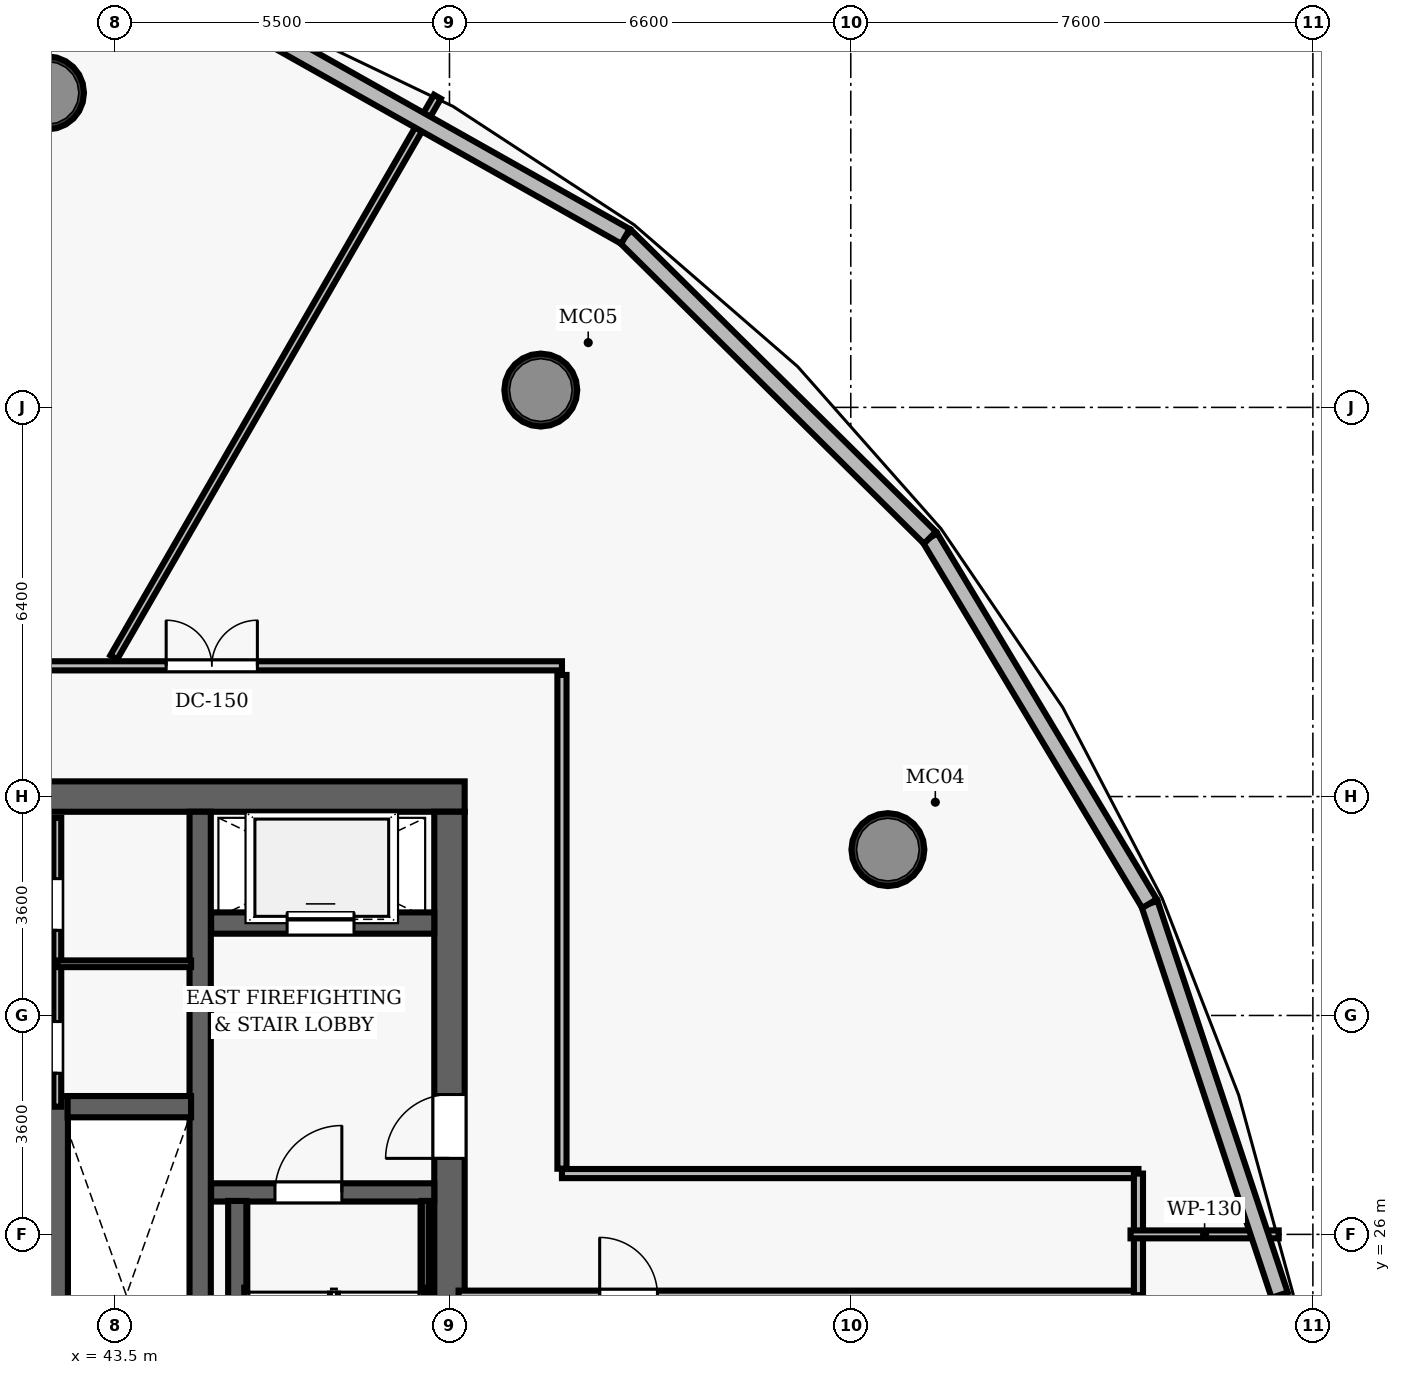
"""IFC4 building model, lengths in metres.
Left out: names, types, materials, properties, quantities, classifications, styles, units other than length and angle.
Written with IfcOpenShell. Run it as: python <this file> out.ifc"""

import sys

from ifc_helpers import new_model, si_unit, direction, frame, frame_2d, origin, origin_2d, place, context, subcontext, project, spatial, rectangle, hollow_circle, extrude, element, fill, save


model = new_model("IFC4")
c1 = context("Model", 3, precision=1e-05, world=origin(), true_north=direction((0.0, 1.0)))
c2 = subcontext(c1, "Body", "Model", "MODEL_VIEW")
j1 = project(units=[si_unit("LENGTHUNIT", "METRE"), si_unit("PLANEANGLEUNIT", "RADIAN")], contexts=[c1])
p1 = place(None, origin())
s1 = spatial("IfcSite", under=j1, at=p1, CompositionType="ELEMENT")
p2 = place(p1, origin())
s2 = spatial("IfcBuilding", under=s1, at=p2, CompositionType="ELEMENT")
p3 = place(p2, frame((0.0, 0.0, 178.9)))
s3 = spatial("IfcBuildingStorey", under=s2, at=p3, CompositionType="ELEMENT", Elevation=178.9)
p4 = place(p3, frame((26.75, 33.2, 0.0), z_axis=(0.0, 0.0, 1.0), x_axis=(1.0, 0.0, 0.0)))
e1 = element("IfcWall", 1, at=p4, inside=s3, PredefinedType="SHEAR", context=c2, shape_type="SweptSolid", body=[
    extrude(rectangle(XDim=22.5, YDim=0.5, at=frame_2d((11.25, 0.0))), origin(), (0.0, 0.0, 1.0), 3.85),
])
p5 = place(p4, frame((4.57, 0.0, 0.0)))
e2 = element("IfcOpeningElement", 2, at=p5, cuts=e1, PredefinedType="OPENING", context=c2, shape_type="SweptSolid", body=[
    extrude(rectangle(XDim=1.05, YDim=2.15, at=frame_2d((0.525, 1.075))), frame((0.0, 0.26, 0.0), z_axis=(0.0, -1.0, 0.0), x_axis=(1.0, 0.0, 0.0)), (0.0, 0.0, 1.0), 0.52),
])
p6 = place(p4, frame((14.47, 0.0, 0.0)))
e3 = element("IfcOpeningElement", 3, at=p6, cuts=e1, PredefinedType="OPENING", context=c2, shape_type="SweptSolid", body=[
    extrude(rectangle(XDim=1.05, YDim=2.15, at=frame_2d((0.525, 1.075))), frame((0.0, 0.26, 0.0), z_axis=(0.0, -1.0, 0.0), x_axis=(1.0, 0.0, 0.0)), (0.0, 0.0, 1.0), 0.52),
])
p7 = place(p3, frame((49.0, 19.05, 0.0), z_axis=(0.0, 0.0, 1.0), x_axis=(0.0, 1.0, 0.0)))
e4 = element("IfcWall", 4, at=p7, inside=s3, PredefinedType="SHEAR", context=c2, shape_type="SweptSolid", body=[
    extrude(rectangle(XDim=13.9, YDim=0.5, at=frame_2d((6.95, 0.0))), origin(), (0.0, 0.0, 1.0), 3.85),
])
p8 = place(p7, frame((8.2, 0.0, 0.0)))
e5 = element("IfcOpeningElement", 5, at=p8, cuts=e4, PredefinedType="OPENING", context=c2, shape_type="SweptSolid", body=[
    extrude(rectangle(XDim=1.05, YDim=2.15, at=frame_2d((0.525, 1.075))), frame((0.0, 0.26, 0.0), z_axis=(0.0, -1.0, 0.0), x_axis=(1.0, 0.0, 0.0)), (0.0, 0.0, 1.0), 0.52),
])
p9 = place(p3, frame((44.9, 19.05, 0.0), z_axis=(0.0, 0.0, 1.0), x_axis=(0.0, 1.0, 0.0)))
e6 = element("IfcWall", 6, at=p9, inside=s3, PredefinedType="SHEAR", context=c2, shape_type="SweptSolid", body=[
    extrude(rectangle(XDim=13.9, YDim=0.35, at=frame_2d((6.95, 0.0))), origin(), (0.0, 0.0, 1.0), 3.85),
])
for number, where, z_axis, x_axis in (
    (7, (56.21, 32.327, 0.0), (0.0, 0.0, 1.0), (1.0, 0.0, 0.0)),
    (8, (50.502, 39.885, 0.0), (0.0, 0.0, 1.0), (1.0, 0.0, 0.0)),
    (9, (42.389, 44.772, 0.0), (0.0, 0.0, 1.0), (1.0, 0.0, 0.0)),
):
    element("IfcColumn", number, at=place(p3, frame(where, z_axis=z_axis, x_axis=x_axis)), inside=s3, PredefinedType="COLUMN", context=c2, shape_type="SweptSolid", body=[
        extrude(hollow_circle(Radius=0.6, WallThickness=0.05, at=origin_2d()), origin(), (0.0, 0.0, 1.0), 3.85),
    ])
p10 = place(p3, frame((45.08, 26.69, 0.0), z_axis=(0.0, 0.0, 1.0), x_axis=(1.0, 0.0, 0.0)))
e10 = element("IfcWall", 10, at=p10, inside=s3, PredefinedType="SHEAR", context=c2, shape_type="SweptSolid", body=[
    extrude(rectangle(XDim=3.67, YDim=0.3, at=frame_2d((1.835, 0.0))), origin(), (0.0, 0.0, 1.0), 3.85),
])
p11 = place(p10, frame((1.05, 0.0, 0.0)))
e11 = element("IfcOpeningElement", 11, at=p11, cuts=e10, PredefinedType="OPENING", context=c2, shape_type="SweptSolid", body=[
    extrude(rectangle(XDim=1.1, YDim=2.15, at=frame_2d((0.55, 1.075))), frame((0.0, 0.16, 0.0), z_axis=(0.0, -1.0, 0.0), x_axis=(1.0, 0.0, 0.0)), (0.0, 0.0, 1.0), 0.32),
])
p12 = place(p3, frame((45.51, 19.05, 0.0), z_axis=(0.0, 0.0, 1.0), x_axis=(0.0, 1.0, 0.0)))
e12 = element("IfcWall", 12, at=p12, inside=s3, PredefinedType="SHEAR", context=c2, shape_type="SweptSolid", body=[
    extrude(rectangle(XDim=7.5, YDim=0.3, at=frame_2d((3.75, 0.0))), origin(), (0.0, 0.0, 1.0), 3.85),
])
p13 = place(p3, frame((48.605, 19.1, 0.0), z_axis=(0.0, 0.0, 1.0), x_axis=(0.0, 1.0, 0.0)))
e13 = element("IfcWall", 13, at=p13, inside=s3, PredefinedType="SHEAR", context=c2, shape_type="SweptSolid", body=[
    extrude(rectangle(XDim=7.45, YDim=0.12, at=frame_2d((3.725, 0.0))), origin(), (0.0, 0.0, 1.0), 3.85),
])
p14 = place(p3, frame((45.08, 31.12, 0.0), z_axis=(0.0, 0.0, 1.0), x_axis=(1.0, 0.0, 0.0)))
e14 = element("IfcWall", 14, at=p14, inside=s3, PredefinedType="SHEAR", context=c2, shape_type="SweptSolid", body=[
    extrude(rectangle(XDim=3.67, YDim=0.35, at=frame_2d((1.835, 0.0))), origin(), (0.0, 0.0, 1.0), 3.035),
])
p15 = place(p14, frame((1.25, 0.0, 0.0)))
e15 = element("IfcOpeningElement", 15, at=p15, cuts=e14, PredefinedType="OPENING", context=c2, shape_type="SweptSolid", body=[
    extrude(rectangle(XDim=1.1, YDim=2.15, at=frame_2d((0.55, 1.075))), frame((0.0, 0.185, 0.0), z_axis=(0.0, -1.0, 0.0), x_axis=(1.0, 0.0, 0.0)), (0.0, 0.0, 1.0), 0.37),
])
p16 = place(p3, frame((42.55, 21.73, 0.0), z_axis=(0.0, 0.0, 1.0), x_axis=(0.0, 1.0, 0.0)))
e16 = element("IfcWall", 16, at=p16, inside=s3, PredefinedType="SHEAR", context=c2, shape_type="SweptSolid", body=[
    extrude(rectangle(XDim=6.54, YDim=0.35, at=frame_2d((3.27, 0.0))), origin(), (0.0, 0.0, 1.0), 3.035),
])
p17 = place(p3, frame((42.72, 28.1, 0.0), z_axis=(0.0, 0.0, 1.0), x_axis=(1.0, 0.0, 0.0)))
e17 = element("IfcWall", 17, at=p17, inside=s3, PredefinedType="SHEAR", context=c2, shape_type="SweptSolid", body=[
    extrude(rectangle(XDim=2.03, YDim=0.35, at=frame_2d((1.015, 0.0))), origin(), (0.0, 0.0, 1.0), 3.035),
])
p18 = place(p3, frame((42.55, 28.1, 0.0), z_axis=(0.0, 0.0, 1.0), x_axis=(0.0, 1.0, 0.0)))
e18 = element("IfcWall", 18, at=p18, inside=s3, PredefinedType="PARTITIONING", context=c2, shape_type="SweptSolid", body=[
    extrude(rectangle(XDim=4.75, YDim=0.13, at=frame_2d((2.375, 0.0))), origin(), (0.0, 0.0, 1.0), 3.035),
])
p19 = place(p18, frame((0.55, 0.0, 0.0)))
e19 = element("IfcOpeningElement", 19, at=p19, cuts=e18, PredefinedType="OPENING", context=c2, shape_type="SweptSolid", body=[
    extrude(rectangle(XDim=0.85, YDim=2.1, at=frame_2d((0.425, 1.05))), frame((0.0, 0.075, 0.0), z_axis=(0.0, -1.0, 0.0), x_axis=(1.0, 0.0, 0.0)), (0.0, 0.0, 1.0), 0.15),
])
p20 = place(p18, frame((2.9, 0.0, 0.0)))
e20 = element("IfcOpeningElement", 20, at=p20, cuts=e18, PredefinedType="OPENING", context=c2, shape_type="SweptSolid", body=[
    extrude(rectangle(XDim=0.85, YDim=2.1, at=frame_2d((0.425, 1.05))), frame((0.0, 0.075, 0.0), z_axis=(0.0, -1.0, 0.0), x_axis=(1.0, 0.0, 0.0)), (0.0, 0.0, 1.0), 0.15),
])
p21 = place(p3, frame((42.55, 30.45, 0.0), z_axis=(0.0, 0.0, 1.0), x_axis=(1.0, 0.0, 0.0)))
e21 = element("IfcWall", 21, at=p21, inside=s3, PredefinedType="PARTITIONING", context=c2, shape_type="SweptSolid", body=[
    extrude(rectangle(XDim=2.2, YDim=0.11, at=frame_2d((1.1, 0.0))), origin(), (0.0, 0.0, 1.0), 3.035),
])
p22 = place(p3, frame((24.85, 35.35, 0.0), z_axis=(0.0, 0.0, 1.0), x_axis=(1.0, 0.0, 0.0)))
e22 = element("IfcWall", 22, at=p22, inside=s3, PredefinedType="PARTITIONING", context=c2, shape_type="SweptSolid", body=[
    extrude(rectangle(XDim=26.0, YDim=0.15, at=frame_2d((13.0, 0.0))), origin(), (0.0, 0.0, 1.0), 3.035),
])
p23 = place(p22, frame((19.491, 0.0, 0.0)))
e23 = element("IfcOpeningElement", 23, at=p23, cuts=e22, PredefinedType="OPENING", context=c2, shape_type="SweptSolid", body=[
    extrude(rectangle(XDim=1.5, YDim=2.2, at=frame_2d((0.75, 1.1))), frame((0.0, 0.085, 0.0), z_axis=(0.0, -1.0, 0.0), x_axis=(1.0, 0.0, 0.0)), (0.0, 0.0, 1.0), 0.17),
])
p24 = place(p22, frame((9.516, 0.0, 0.0)))
e24 = element("IfcOpeningElement", 24, at=p24, cuts=e22, PredefinedType="OPENING", context=c2, shape_type="SweptSolid", body=[
    extrude(rectangle(XDim=1.5, YDim=2.2, at=frame_2d((0.75, 1.1))), frame((0.0, 0.085, 0.0), z_axis=(0.0, -1.0, 0.0), x_axis=(1.0, 0.0, 0.0)), (0.0, 0.0, 1.0), 0.17),
])
p25 = place(p22, frame((5.234, 0.0, 0.0)))
e25 = element("IfcOpeningElement", 25, at=p25, cuts=e22, PredefinedType="OPENING", context=c2, shape_type="SweptSolid", body=[
    extrude(rectangle(XDim=1.5, YDim=2.2, at=frame_2d((0.75, 1.1))), frame((0.0, 0.085, 0.0), z_axis=(0.0, -1.0, 0.0), x_axis=(1.0, 0.0, 0.0)), (0.0, 0.0, 1.0), 0.17),
])
p26 = place(p3, frame((50.85, 27.08, 0.0), z_axis=(0.0, 0.0, 1.0), x_axis=(0.0, 1.0, 0.0)))
e26 = element("IfcWall", 26, at=p26, inside=s3, PredefinedType="PARTITIONING", context=c2, shape_type="SweptSolid", body=[
    extrude(rectangle(XDim=8.12, YDim=0.15, at=frame_2d((4.06, 0.0))), origin(), (0.0, 0.0, 1.0), 3.035),
])
p27 = place(p3, frame((50.85, 27.0, 0.0), z_axis=(0.0, 0.0, 1.0), x_axis=(1.0, 0.0, 0.0)))
e27 = element("IfcWall", 27, at=p27, inside=s3, PredefinedType="PARTITIONING", context=c2, shape_type="SweptSolid", body=[
    extrude(rectangle(XDim=9.481, YDim=0.15, at=frame_2d((4.74, 0.0))), origin(), (0.0, 0.0, 1.0), 3.035),
])
p28 = place(p3, frame((49.15, 25.0, 0.0), z_axis=(0.0, 0.0, 1.0), x_axis=(1.0, 0.0, 0.0)))
e28 = element("IfcWall", 28, at=p28, inside=s3, PredefinedType="PARTITIONING", context=c2, shape_type="SweptSolid", body=[
    extrude(rectangle(XDim=11.181, YDim=0.15, at=frame_2d((5.591, 0.0))), origin(), (0.0, 0.0, 1.0), 3.035),
])
p29 = place(p28, frame((2.32, 0.0, 0.0)))
e29 = element("IfcOpeningElement", 29, at=p29, cuts=e28, PredefinedType="OPENING", context=c2, shape_type="SweptSolid", body=[
    extrude(rectangle(XDim=0.95, YDim=2.15, at=frame_2d((0.475, 1.075))), frame((0.0, 0.085, 0.0), z_axis=(0.0, -1.0, 0.0), x_axis=(1.0, 0.0, 0.0)), (0.0, 0.0, 1.0), 0.17),
])
p30 = place(p3, frame((60.331, 25.0, 0.0), z_axis=(0.0, 0.0, 1.0), x_axis=(0.0, 1.0, 0.0)))
e30 = element("IfcWall", 30, at=p30, inside=s3, PredefinedType="PARTITIONING", context=c2, shape_type="SweptSolid", body=[
    extrude(rectangle(XDim=2.0, YDim=0.15, at=frame_2d((1.0, 0.0))), origin(), (0.0, 0.0, 1.0), 3.035),
])
p31 = place(p3, frame((60.201, 26.0, 0.0), z_axis=(0.0, 0.0, 1.0), x_axis=(1.0, 0.0, 0.0)))
e31 = element("IfcWall", 31, at=p31, inside=s3, PredefinedType="PARTITIONING", context=c2, shape_type="SweptSolid", body=[
    extrude(rectangle(XDim=2.437, YDim=0.13, at=frame_2d((1.219, 0.0))), origin(), (0.0, 0.0, 1.0), 3.035),
])
p32 = place(p3, frame((43.479, 35.49, 0.0), z_axis=(0.0, 0.0, 1.0), x_axis=(0.500004366266, 0.866022882905, 0.0)))
e32 = element("IfcWall", 32, at=p32, inside=s3, PredefinedType="PARTITIONING", context=c2, shape_type="SweptSolid", body=[
    extrude(rectangle(XDim=10.645, YDim=0.13, at=frame_2d((5.323, 0.0))), origin(), (0.0, 0.0, 1.0), 3.035),
])
p33 = place(p3, frame((60.512, 31.439, 0.0), z_axis=(0.0, 0.0, 1.0), x_axis=(0.315590755591, -0.948895397283, 0.0)))
e33 = element("IfcWall", 33, at=p33, inside=s3, PredefinedType="SOLIDWALL", context=c2, shape_type="SweptSolid", body=[
    extrude(rectangle(XDim=6.784, YDim=0.28, at=frame_2d((3.392, 0.0))), origin(), (0.0, 0.0, 1.0), 3.62),
])
p34 = place(p3, frame((56.902, 37.457, 0.0), z_axis=(0.0, 0.0, 1.0), x_axis=(0.514434360632, -0.857529759601, 0.0)))
e34 = element("IfcWall", 34, at=p34, inside=s3, PredefinedType="SOLIDWALL", context=c2, shape_type="SweptSolid", body=[
    extrude(rectangle(XDim=7.018, YDim=0.28, at=frame_2d((3.509, 0.0))), origin(), (0.0, 0.0, 1.0), 3.62),
])
p35 = place(p3, frame((51.894, 42.413, 0.0), z_axis=(0.0, 0.0, 1.0), x_axis=(0.710873697504, -0.703319689897, 0.0)))
e35 = element("IfcWall", 35, at=p35, inside=s3, PredefinedType="SOLIDWALL", context=c2, shape_type="SweptSolid", body=[
    extrude(rectangle(XDim=7.046, YDim=0.28, at=frame_2d((3.523, 0.0))), origin(), (0.0, 0.0, 1.0), 3.62),
])
p36 = place(p3, frame((45.756, 45.872, 0.0), z_axis=(0.0, 0.0, 1.0), x_axis=(0.87116433645, -0.490991546665, 0.0)))
e36 = element("IfcWall", 36, at=p36, inside=s3, PredefinedType="SOLIDWALL", context=c2, shape_type="SweptSolid", body=[
    extrude(rectangle(XDim=7.045, YDim=0.28, at=frame_2d((3.523, 0.0))), origin(), (0.0, 0.0, 1.0), 3.62),
])
p37 = place(p11, origin())
e37 = element("IfcDoor", 37, at=p37, inside=s3, OperationType="SINGLE_SWING_RIGHT", PredefinedType="DOOR", context=c2, shape_type="SweptSolid", body=[
    extrude(rectangle(XDim=1.1, YDim=2.15, at=frame_2d((0.55, 1.075))), frame((0.0, 0.025, 0.0), z_axis=(0.0, -1.0, 0.0), x_axis=(1.0, 0.0, 0.0)), (0.0, 0.0, 1.0), 0.05),
])
fill(e11, e37)
p38 = place(p8, origin())
e38 = element("IfcDoor", 38, at=p38, inside=s3, OperationType="SINGLE_SWING_LEFT", PredefinedType="DOOR", context=c2, shape_type="SweptSolid", body=[
    extrude(rectangle(XDim=1.05, YDim=2.15, at=frame_2d((0.525, 1.075))), frame((0.0, 0.025, 0.0), z_axis=(0.0, -1.0, 0.0), x_axis=(1.0, 0.0, 0.0)), (0.0, 0.0, 1.0), 0.05),
])
fill(e5, e38)
p39 = place(p19, origin())
e39 = element("IfcDoor", 39, at=p39, inside=s3, OperationType="SINGLE_SWING_LEFT", PredefinedType="DOOR", context=c2, shape_type="SweptSolid", body=[
    extrude(rectangle(XDim=0.85, YDim=2.1, at=frame_2d((0.425, 1.05))), frame((0.0, 0.025, 0.0), z_axis=(0.0, -1.0, 0.0), x_axis=(1.0, 0.0, 0.0)), (0.0, 0.0, 1.0), 0.05),
])
fill(e19, e39)
p40 = place(p20, origin())
e40 = element("IfcDoor", 40, at=p40, inside=s3, OperationType="SINGLE_SWING_LEFT", PredefinedType="DOOR", context=c2, shape_type="SweptSolid", body=[
    extrude(rectangle(XDim=0.85, YDim=2.1, at=frame_2d((0.425, 1.05))), frame((0.0, 0.025, 0.0), z_axis=(0.0, -1.0, 0.0), x_axis=(1.0, 0.0, 0.0)), (0.0, 0.0, 1.0), 0.05),
])
fill(e20, e40)
p41 = place(p23, origin())
e41 = element("IfcDoor", 41, at=p41, inside=s3, OperationType="DOUBLE_DOOR_SINGLE_SWING", PredefinedType="DOOR", context=c2, shape_type="SweptSolid", body=[
    extrude(rectangle(XDim=1.5, YDim=2.2, at=frame_2d((0.75, 1.1))), frame((0.0, 0.025, 0.0), z_axis=(0.0, -1.0, 0.0), x_axis=(1.0, 0.0, 0.0)), (0.0, 0.0, 1.0), 0.05),
])
fill(e23, e41)
p42 = place(p29, origin())
e42 = element("IfcDoor", 42, at=p42, inside=s3, OperationType="SINGLE_SWING_LEFT", PredefinedType="DOOR", context=c2, shape_type="SweptSolid", body=[
    extrude(rectangle(XDim=0.95, YDim=2.15, at=frame_2d((0.475, 1.075))), frame((0.0, 0.025, 0.0), z_axis=(0.0, -1.0, 0.0), x_axis=(1.0, 0.0, 0.0)), (0.0, 0.0, 1.0), 0.05),
])
fill(e29, e42)
p43 = place(p15, origin())
e43 = element("IfcDoor", 43, at=p43, inside=s3, OperationType="SLIDING_TO_LEFT", PredefinedType="DOOR", context=c2, shape_type="SweptSolid", body=[
    extrude(rectangle(XDim=1.1, YDim=2.15, at=frame_2d((0.55, 1.075))), frame((0.0, 0.025, 0.0), z_axis=(0.0, -1.0, 0.0), x_axis=(1.0, 0.0, 0.0)), (0.0, 0.0, 1.0), 0.05),
])
fill(e15, e43)
save(model, sys.argv[1])
